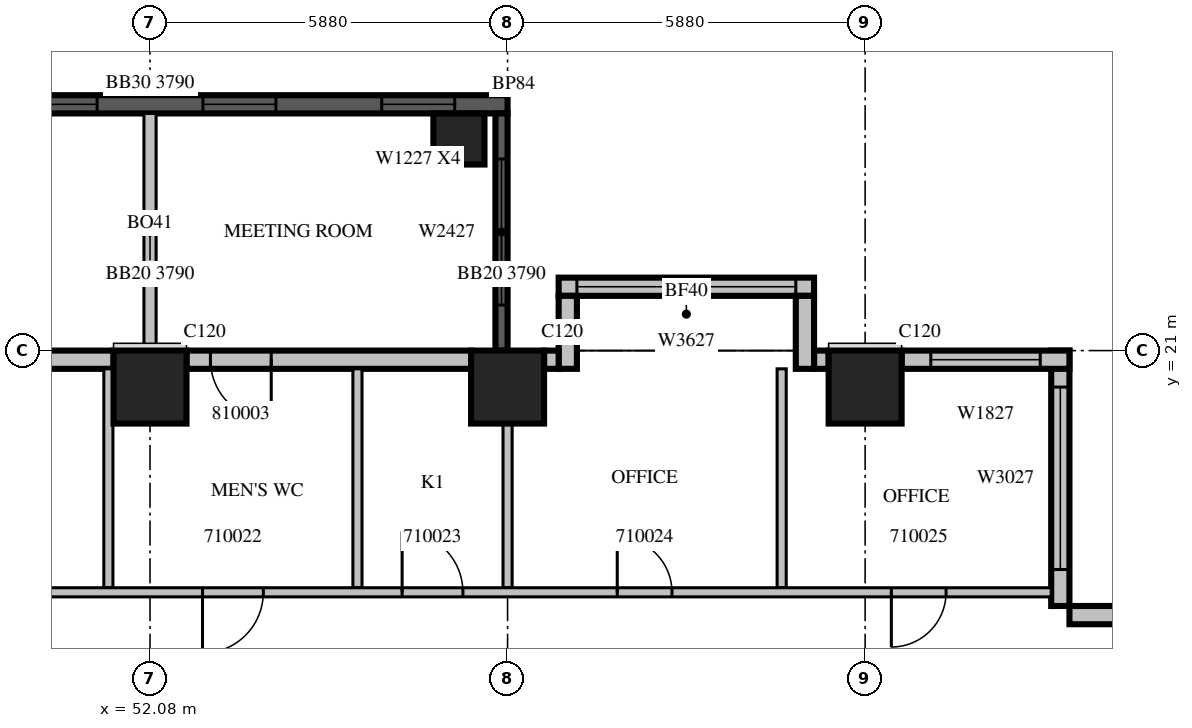
"""IFC4 building model, lengths in metres.
Left out: names, types, materials, properties, quantities, classifications, styles, units other than length and angle.
Written with IfcOpenShell. Run it as: python <this file> out.ifc"""

import sys

from ifc_helpers import new_model, si_unit, direction, frame, frame_2d, origin, origin_2d, place, context, subcontext, project, spatial, rectangle, extrude, source, transform, mapped, element, fill, save


model = new_model("IFC4")
c1 = context("Model", 3, precision=1e-05, world=origin(), true_north=direction((0.0, 1.0)))
c2 = subcontext(c1, "Body", "Model", "MODEL_VIEW")
j1 = project(units=[si_unit("LENGTHUNIT", "METRE"), si_unit("PLANEANGLEUNIT", "RADIAN")], contexts=[c1])
p1 = place(None, origin())
s1 = spatial("IfcSite", under=j1, at=p1, CompositionType="ELEMENT")
p2 = place(p1, origin())
s2 = spatial("IfcBuilding", under=s1, at=p2, CompositionType="ELEMENT")
p3 = place(p2, frame((0.0, 0.0, 53.1)))
s3 = spatial("IfcBuildingStorey", under=s2, at=p3, CompositionType="ELEMENT", Elevation=53.1)
m1 = source(origin(), c2, "Body", "SweptSolid", [
    extrude(rectangle(XDim=1.2, YDim=1.2, at=origin_2d()), origin(), (0.0, 0.0, 1.0), 4.2),
])
for number, where, z_axis, x_axis in (
    (1, (52.08, 20.4, 0.0), (0.0, 0.0, 1.0), (1.0, 0.0, 0.0)),
    (2, (57.96, 20.4, 0.0), (0.0, 0.0, 1.0), (1.0, 0.0, 0.0)),
    (3, (63.84, 20.4, 0.0), (0.0, 0.0, 1.0), (1.0, 0.0, 0.0)),
):
    element("IfcColumn", number, at=place(p3, frame(where, z_axis=z_axis, x_axis=x_axis)), inside=s3, PredefinedType="COLUMN", context=c2, shape_type="MappedRepresentation", body=[
        mapped(m1, transform((0.0, 0.0, 0.0), scale=1.0)),
    ])
m2 = source(origin(), c2, "Body", "SweptSolid", [
    extrude(rectangle(XDim=0.84, YDim=0.84, at=origin_2d()), origin(), (0.0, 0.0, 1.0), 4.2),
])
p4 = place(p3, frame((57.16, 24.48, 0.0), z_axis=(0.0, 0.0, 1.0), x_axis=(1.0, 0.0, 0.0)))
e4 = element("IfcColumn", 4, at=p4, inside=s3, PredefinedType="COLUMN", context=c2, shape_type="MappedRepresentation", body=[
    mapped(m2, transform((0.0, 0.0, 0.0), scale=1.0)),
])
m3 = source(origin(), c2, "Body", "SweptSolid", [
    extrude(rectangle(XDim=11.76, YDim=0.3, at=frame_2d((5.88, 0.0))), origin(), (0.0, 0.0, 1.0), 3.79),
])
p5 = place(p3, frame((57.96, 25.05, 0.0), z_axis=(0.0, 0.0, 1.0), x_axis=(-1.0, 0.0, 0.0)))
e5 = element("IfcWall", 5, at=p5, inside=s3, PredefinedType="SOLIDWALL", context=c2, shape_type="MappedRepresentation", body=[
    mapped(m3, transform((0.0, 0.0, 0.0), scale=1.0)),
])
m4 = source(origin(), c2, "Body", "SweptSolid", [
    extrude(rectangle(XDim=1.2, YDim=2.7, at=frame_2d((0.6, 1.35))), frame((0.0, 0.16, 0.0), z_axis=(0.0, -1.0, 0.0), x_axis=(1.0, 0.0, 0.0)), (0.0, 0.0, 1.0), 0.32),
])
p6 = place(p5, frame((0.87, 0.0, 0.6)))
e6 = element("IfcOpeningElement", 6, at=p6, cuts=e5, PredefinedType="OPENING", context=c2, shape_type="MappedRepresentation", body=[
    mapped(m4, transform((0.0, 0.0, 0.0), scale=1.0)),
])
p7 = place(p5, frame((3.81, 0.0, 0.6)))
e7 = element("IfcOpeningElement", 7, at=p7, cuts=e5, PredefinedType="OPENING", context=c2, shape_type="MappedRepresentation", body=[
    mapped(m4, transform((0.0, 0.0, 0.0), scale=1.0)),
])
p8 = place(p5, frame((6.75, 0.0, 0.6)))
e8 = element("IfcOpeningElement", 8, at=p8, cuts=e5, PredefinedType="OPENING", context=c2, shape_type="MappedRepresentation", body=[
    mapped(m4, transform((0.0, 0.0, 0.0), scale=1.0)),
])
p9 = place(p5, frame((9.69, 0.0, 0.6)))
e9 = element("IfcOpeningElement", 9, at=p9, cuts=e5, PredefinedType="OPENING", context=c2, shape_type="MappedRepresentation", body=[
    mapped(m4, transform((0.0, 0.0, 0.0), scale=1.0)),
])
m5 = source(origin(), c2, "Body", "SweptSolid", [
    extrude(rectangle(XDim=3.9, YDim=0.2, at=frame_2d((1.95, 0.0))), origin(), (0.0, 0.0, 1.0), 3.79),
])
p10 = place(p3, frame((52.08, 21.0, 0.0), z_axis=(0.0, 0.0, 1.0), x_axis=(0.0, 1.0, 0.0)))
e10 = element("IfcWall", 10, at=p10, inside=s3, PredefinedType="SOLIDWALL", context=c2, shape_type="MappedRepresentation", body=[
    mapped(m5, transform((0.0, 0.0, 0.0), scale=1.0)),
])
m6 = source(origin(), c2, "Body", "SweptSolid", [
    extrude(rectangle(XDim=3.9, YDim=0.2, at=frame_2d((1.95, 0.0))), origin(), (0.0, 0.0, 1.0), 3.79),
])
p11 = place(p3, frame((57.86, 21.0, 0.0), z_axis=(0.0, 0.0, 1.0), x_axis=(0.0, 1.0, 0.0)))
e11 = element("IfcWall", 11, at=p11, inside=s3, PredefinedType="SOLIDWALL", context=c2, shape_type="MappedRepresentation", body=[
    mapped(m6, transform((0.0, 0.0, 0.0), scale=1.0)),
])
m7 = source(origin(), c2, "Body", "SweptSolid", [
    extrude(rectangle(XDim=2.4, YDim=2.7, at=frame_2d((1.2, 1.35))), frame((0.0, 0.11, 0.0), z_axis=(0.0, -1.0, 0.0), x_axis=(1.0, 0.0, 0.0)), (0.0, 0.0, 1.0), 0.22),
])
p12 = place(p11, frame((0.75, 0.0, 0.6)))
e12 = element("IfcOpeningElement", 12, at=p12, cuts=e11, PredefinedType="OPENING", context=c2, shape_type="MappedRepresentation", body=[
    mapped(m7, transform((0.0, 0.0, 0.0), scale=1.0)),
])
m8 = source(origin(), c2, "Body", "SweptSolid", [
    extrude(rectangle(XDim=4.2, YDim=0.3, at=frame_2d((2.1, 0.0))), origin(), (0.0, 0.0, 1.0), 3.8),
])
p13 = place(p3, frame((71.4, 16.65, 0.0), z_axis=(0.0, 0.0, 1.0), x_axis=(-1.0, 0.0, 0.0)))
e13 = element("IfcWall", 13, at=p13, inside=s3, PredefinedType="STANDARD", context=c2, shape_type="MappedRepresentation", body=[
    mapped(m8, transform((0.0, 0.0, 0.0), scale=1.0)),
])
p14 = place(p13, frame((0.66, 0.0, 0.6)))
e14 = element("IfcOpeningElement", 14, at=p14, cuts=e13, PredefinedType="OPENING", context=c2, shape_type="MappedRepresentation", body=[
    mapped(m4, transform((0.0, 0.0, 0.0), scale=1.0)),
])
p15 = place(p3, frame((67.05, 16.8, 0.0), z_axis=(0.0, 0.0, 1.0), x_axis=(0.0, 1.0, 0.0)))
e15 = element("IfcWall", 15, at=p15, inside=s3, PredefinedType="STANDARD", context=c2, shape_type="MappedRepresentation", body=[
    mapped(m8, transform((0.0, 0.0, 0.0), scale=1.0)),
])
m9 = source(origin(), c2, "Body", "SweptSolid", [
    extrude(rectangle(XDim=3.0, YDim=2.7, at=frame_2d((1.5, 1.35))), frame((0.0, 0.16, 0.0), z_axis=(0.0, -1.0, 0.0), x_axis=(1.0, 0.0, 0.0)), (0.0, 0.0, 1.0), 0.32),
])
p16 = place(p15, frame((0.6, 0.0, 0.6)))
e16 = element("IfcOpeningElement", 16, at=p16, cuts=e15, PredefinedType="OPENING", context=c2, shape_type="MappedRepresentation", body=[
    mapped(m9, transform((0.0, 0.0, 0.0), scale=1.0)),
])
m10 = source(origin(), c2, "Body", "SweptSolid", [
    extrude(rectangle(XDim=2.76, YDim=0.3, at=frame_2d((1.38, 0.0))), origin(), (0.0, 0.0, 1.0), 3.8),
])
p17 = place(p3, frame((67.2, 20.85, 0.0), z_axis=(0.0, 0.0, 1.0), x_axis=(-1.0, 0.0, 0.0)))
e17 = element("IfcWall", 17, at=p17, inside=s3, PredefinedType="STANDARD", context=c2, shape_type="MappedRepresentation", body=[
    mapped(m10, transform((0.0, 0.0, 0.0), scale=1.0)),
])
m11 = source(origin(), c2, "Body", "SweptSolid", [
    extrude(rectangle(XDim=1.8, YDim=2.7, at=frame_2d((0.9, 1.35))), frame((0.0, 0.16, 0.0), z_axis=(0.0, -1.0, 0.0), x_axis=(1.0, 0.0, 0.0)), (0.0, 0.0, 1.0), 0.32),
])
p18 = place(p17, frame((0.48, 0.0, 0.6)))
e18 = element("IfcOpeningElement", 18, at=p18, cuts=e17, PredefinedType="OPENING", context=c2, shape_type="MappedRepresentation", body=[
    mapped(m11, transform((0.0, 0.0, 0.0), scale=1.0)),
])
m12 = source(origin(), c2, "Body", "SweptSolid", [
    extrude(rectangle(XDim=0.24, YDim=0.3, at=frame_2d((0.12, 0.0))), origin(), (0.0, 0.0, 1.0), 3.8),
])
p19 = place(p3, frame((63.24, 20.85, 0.0), z_axis=(0.0, 0.0, 1.0), x_axis=(-1.0, 0.0, 0.0)))
e19 = element("IfcWall", 19, at=p19, inside=s3, PredefinedType="STANDARD", context=c2, shape_type="MappedRepresentation", body=[
    mapped(m12, transform((0.0, 0.0, 0.0), scale=1.0)),
])
p20 = place(p3, frame((63.0, 22.05, 0.0), z_axis=(0.0, 0.0, 1.0), x_axis=(-1.0, 0.0, 0.0)))
e20 = element("IfcWall", 20, at=p20, inside=s3, PredefinedType="STANDARD", context=c2, shape_type="MappedRepresentation", body=[
    mapped(m8, transform((0.0, 0.0, 0.0), scale=1.0)),
])
m13 = source(origin(), c2, "Body", "SweptSolid", [
    extrude(rectangle(XDim=3.6, YDim=2.7, at=frame_2d((1.8, 1.35))), frame((0.0, 0.16, 0.0), z_axis=(0.0, -1.0, 0.0), x_axis=(1.0, 0.0, 0.0)), (0.0, 0.0, 1.0), 0.32),
])
p21 = place(p20, frame((0.3, 0.0, 0.6)))
e21 = element("IfcOpeningElement", 21, at=p21, cuts=e20, PredefinedType="OPENING", context=c2, shape_type="MappedRepresentation", body=[
    mapped(m13, transform((0.0, 0.0, 0.0), scale=1.0)),
])
m14 = source(origin(), c2, "Body", "SweptSolid", [
    extrude(rectangle(XDim=1.2, YDim=0.3, at=frame_2d((0.6, 0.0))), origin(), (0.0, 0.0, 1.0), 3.8),
])
for number, where, z_axis, x_axis in (
    (22, (62.85, 20.7, 0.0), (0.0, 0.0, 1.0), (0.0, 1.0, 0.0)),
    (23, (58.95, 20.7, 0.0), (0.0, 0.0, 1.0), (0.0, 1.0, 0.0)),
):
    element("IfcWall", number, at=place(p3, frame(where, z_axis=z_axis, x_axis=x_axis)), inside=s3, PredefinedType="STANDARD", context=c2, shape_type="MappedRepresentation", body=[
        mapped(m14, transform((0.0, 0.0, 0.0), scale=1.0)),
    ])
p22 = place(p3, frame((58.8, 20.85, 0.0), z_axis=(0.0, 0.0, 1.0), x_axis=(-1.0, 0.0, 0.0)))
e24 = element("IfcWall", 24, at=p22, inside=s3, PredefinedType="STANDARD", context=c2, shape_type="MappedRepresentation", body=[
    mapped(m12, transform((0.0, 0.0, 0.0), scale=1.0)),
])
m15 = source(origin(), c2, "Body", "SweptSolid", [
    extrude(rectangle(XDim=4.68, YDim=0.3, at=frame_2d((2.34, 0.0))), origin(), (0.0, 0.0, 1.0), 3.8),
])
p23 = place(p3, frame((57.36, 20.85, 0.0), z_axis=(0.0, 0.0, 1.0), x_axis=(-1.0, 0.0, 0.0)))
e25 = element("IfcWall", 25, at=p23, inside=s3, PredefinedType="STANDARD", context=c2, shape_type="MappedRepresentation", body=[
    mapped(m15, transform((0.0, 0.0, 0.0), scale=1.0)),
])
m16 = source(origin(), c2, "Body", "SweptSolid", [
    extrude(rectangle(XDim=1.0, YDim=2.1, at=frame_2d((0.5, 1.05))), frame((0.0, 0.16, 0.0), z_axis=(0.0, -1.0, 0.0), x_axis=(1.0, 0.0, 0.0)), (0.0, 0.0, 1.0), 0.32),
])
p24 = place(p23, frame((3.287, 0.0, 0.0)))
e26 = element("IfcOpeningElement", 26, at=p24, cuts=e25, PredefinedType="OPENING", context=c2, shape_type="MappedRepresentation", body=[
    mapped(m16, transform((0.0, 0.0, 0.0), scale=1.0)),
])
p25 = place(p3, frame((51.48, 20.85, 0.0), z_axis=(0.0, 0.0, 1.0), x_axis=(-1.0, 0.0, 0.0)))
e27 = element("IfcWall", 27, at=p25, inside=s3, PredefinedType="STANDARD", context=c2, shape_type="MappedRepresentation", body=[
    mapped(m15, transform((0.0, 0.0, 0.0), scale=1.0)),
])
p26 = place(p25, frame((1.887, 0.0, 0.0)))
e28 = element("IfcOpeningElement", 28, at=p26, cuts=e27, PredefinedType="OPENING", context=c2, shape_type="MappedRepresentation", body=[
    mapped(m16, transform((0.0, 0.0, 0.0), scale=1.0)),
])
m17 = source(origin(), c2, "Body", "SweptSolid", [
    extrude(rectangle(XDim=3.6, YDim=0.15, at=frame_2d((1.8, 0.0))), origin(), (0.0, 0.0, 1.0), 3.8),
])
for number, where, z_axis, x_axis in (
    (29, (51.395, 20.7, 0.0), (0.0, 0.0, 1.0), (0.0, -1.0, 0.0)),
    (30, (55.491, 20.7, 0.0), (0.0, 0.0, 1.0), (0.0, -1.0, 0.0)),
    (31, (62.468, 20.7, 0.0), (0.0, 0.0, 1.0), (0.0, -1.0, 0.0)),
):
    element("IfcWall", number, at=place(p3, frame(where, z_axis=z_axis, x_axis=x_axis)), inside=s3, PredefinedType="PARTITIONING", context=c2, shape_type="MappedRepresentation", body=[
        mapped(m17, transform((0.0, 0.0, 0.0), scale=1.0)),
    ])
m18 = source(origin(), c2, "Body", "SweptSolid", [
    extrude(rectangle(XDim=2.701, YDim=0.15, at=frame_2d((1.351, 0.0))), origin(), (0.0, 0.0, 1.0), 3.8),
])
p27 = place(p3, frame((57.96, 17.1, 0.0), z_axis=(0.0, 0.0, 1.0), x_axis=(0.0, 1.0, 0.0)))
e32 = element("IfcWall", 32, at=p27, inside=s3, PredefinedType="PARTITIONING", context=c2, shape_type="MappedRepresentation", body=[
    mapped(m18, transform((0.0, 0.0, 0.0), scale=1.0)),
])
m19 = source(origin(), c2, "Body", "SweptSolid", [
    extrude(rectangle(XDim=37.5, YDim=0.15, at=frame_2d((18.75, 0.0))), origin(), (0.0, 0.0, 1.0), 3.8),
])
p28 = place(p3, frame((29.4, 17.025, 0.0), z_axis=(0.0, 0.0, 1.0), x_axis=(1.0, 0.0, 0.0)))
e33 = element("IfcWall", 33, at=p28, inside=s3, PredefinedType="PARTITIONING", context=c2, shape_type="MappedRepresentation", body=[
    mapped(m19, transform((0.0, 0.0, 0.0), scale=1.0)),
])
m20 = source(origin(), c2, "Body", "SweptSolid", [
    extrude(rectangle(XDim=1.0, YDim=2.1, at=frame_2d((0.5, 1.05))), frame((0.0, 0.085, 0.0), z_axis=(0.0, -1.0, 0.0), x_axis=(1.0, 0.0, 0.0)), (0.0, 0.0, 1.0), 0.17),
])
p29 = place(p28, frame((1.357, 0.0, 0.0)))
e34 = element("IfcOpeningElement", 34, at=p29, cuts=e33, PredefinedType="OPENING", context=c2, shape_type="MappedRepresentation", body=[
    mapped(m20, transform((0.0, 0.0, 0.0), scale=1.0)),
])
p30 = place(p28, frame((4.669, 0.0, 0.0)))
e35 = element("IfcOpeningElement", 35, at=p30, cuts=e33, PredefinedType="OPENING", context=c2, shape_type="MappedRepresentation", body=[
    mapped(m20, transform((0.0, 0.0, 0.0), scale=1.0)),
])
p31 = place(p28, frame((7.012, 0.0, 0.0)))
e36 = element("IfcOpeningElement", 36, at=p31, cuts=e33, PredefinedType="OPENING", context=c2, shape_type="MappedRepresentation", body=[
    mapped(m20, transform((0.0, 0.0, 0.0), scale=1.0)),
])
m21 = source(origin(), c2, "Body", "SweptSolid", [
    extrude(rectangle(XDim=0.9, YDim=2.1, at=frame_2d((0.45, 1.05))), frame((0.0, 0.085, 0.0), z_axis=(0.0, -1.0, 0.0), x_axis=(1.0, 0.0, 0.0)), (0.0, 0.0, 1.0), 0.17),
])
p32 = place(p28, frame((10.05, 0.0, 0.0)))
e37 = element("IfcOpeningElement", 37, at=p32, cuts=e33, PredefinedType="OPENING", context=c2, shape_type="MappedRepresentation", body=[
    mapped(m21, transform((0.0, 0.0, 0.0), scale=1.0)),
])
p33 = place(p28, frame((13.401, 0.0, 0.0)))
e38 = element("IfcOpeningElement", 38, at=p33, cuts=e33, PredefinedType="OPENING", context=c2, shape_type="MappedRepresentation", body=[
    mapped(m21, transform((0.0, 0.0, 0.0), scale=1.0)),
])
p34 = place(p28, frame((15.501, 0.0, 0.0)))
e39 = element("IfcOpeningElement", 39, at=p34, cuts=e33, PredefinedType="OPENING", context=c2, shape_type="MappedRepresentation", body=[
    mapped(m21, transform((0.0, 0.0, 0.0), scale=1.0)),
])
p35 = place(p28, frame((18.898, 0.0, 0.0)))
e40 = element("IfcOpeningElement", 40, at=p35, cuts=e33, PredefinedType="OPENING", context=c2, shape_type="MappedRepresentation", body=[
    mapped(m20, transform((0.0, 0.0, 0.0), scale=1.0)),
])
p36 = place(p28, frame((23.543, 0.0, 0.0)))
e41 = element("IfcOpeningElement", 41, at=p36, cuts=e33, PredefinedType="OPENING", context=c2, shape_type="MappedRepresentation", body=[
    mapped(m20, transform((0.0, 0.0, 0.0), scale=1.0)),
])
p37 = place(p28, frame((26.826, 0.0, 0.0)))
e42 = element("IfcOpeningElement", 42, at=p37, cuts=e33, PredefinedType="OPENING", context=c2, shape_type="MappedRepresentation", body=[
    mapped(m20, transform((0.0, 0.0, 0.0), scale=1.0)),
])
p38 = place(p28, frame((30.364, 0.0, 0.0)))
e43 = element("IfcOpeningElement", 43, at=p38, cuts=e33, PredefinedType="OPENING", context=c2, shape_type="MappedRepresentation", body=[
    mapped(m21, transform((0.0, 0.0, 0.0), scale=1.0)),
])
p39 = place(p28, frame((34.871, 0.0, 0.0)))
e44 = element("IfcOpeningElement", 44, at=p39, cuts=e33, PredefinedType="OPENING", context=c2, shape_type="MappedRepresentation", body=[
    mapped(m21, transform((0.0, 0.0, 0.0), scale=1.0)),
])
m22 = source(origin(), c2, "Body", "SweptSolid", [
    extrude(rectangle(XDim=1.2, YDim=2.7, at=frame_2d((0.6, 1.35))), frame((0.0, 0.03, 0.0), z_axis=(0.0, -1.0, 0.0), x_axis=(1.0, 0.0, 0.0)), (0.0, 0.0, 1.0), 0.06),
])
p40 = place(p6, origin())
e45 = element("IfcWindow", 45, at=p40, inside=s3, PartitioningType="SINGLE_PANEL", PredefinedType="WINDOW", context=c2, shape_type="MappedRepresentation", body=[
    mapped(m22, transform((0.0, 0.0, 0.0), scale=1.0)),
])
fill(e6, e45)
p41 = place(p7, origin())
e46 = element("IfcWindow", 46, at=p41, inside=s3, PartitioningType="SINGLE_PANEL", PredefinedType="WINDOW", context=c2, shape_type="MappedRepresentation", body=[
    mapped(m22, transform((0.0, 0.0, 0.0), scale=1.0)),
])
fill(e7, e46)
p42 = place(p8, origin())
e47 = element("IfcWindow", 47, at=p42, inside=s3, PartitioningType="SINGLE_PANEL", PredefinedType="WINDOW", context=c2, shape_type="MappedRepresentation", body=[
    mapped(m22, transform((0.0, 0.0, 0.0), scale=1.0)),
])
fill(e8, e47)
m23 = source(origin(), c2, "Body", "SweptSolid", [
    extrude(rectangle(XDim=2.4, YDim=2.7, at=frame_2d((1.2, 1.35))), frame((0.0, 0.03, 0.0), z_axis=(0.0, -1.0, 0.0), x_axis=(1.0, 0.0, 0.0)), (0.0, 0.0, 1.0), 0.06),
])
p43 = place(p12, origin())
e48 = element("IfcWindow", 48, at=p43, inside=s3, PartitioningType="SINGLE_PANEL", PredefinedType="WINDOW", context=c2, shape_type="MappedRepresentation", body=[
    mapped(m23, transform((0.0, 0.0, 0.0), scale=1.0)),
])
fill(e12, e48)
m24 = source(origin(), c2, "Body", "SweptSolid", [
    extrude(rectangle(XDim=3.0, YDim=2.7, at=frame_2d((1.5, 1.35))), frame((0.0, 0.03, 0.0), z_axis=(0.0, -1.0, 0.0), x_axis=(1.0, 0.0, 0.0)), (0.0, 0.0, 1.0), 0.06),
])
p44 = place(p16, origin())
e49 = element("IfcWindow", 49, at=p44, inside=s3, PartitioningType="SINGLE_PANEL", PredefinedType="WINDOW", context=c2, shape_type="MappedRepresentation", body=[
    mapped(m24, transform((0.0, 0.0, 0.0), scale=1.0)),
])
fill(e16, e49)
m25 = source(origin(), c2, "Body", "SweptSolid", [
    extrude(rectangle(XDim=1.8, YDim=2.7, at=frame_2d((0.9, 1.35))), frame((0.0, 0.03, 0.0), z_axis=(0.0, -1.0, 0.0), x_axis=(1.0, 0.0, 0.0)), (0.0, 0.0, 1.0), 0.06),
])
p45 = place(p18, origin())
e50 = element("IfcWindow", 50, at=p45, inside=s3, PartitioningType="SINGLE_PANEL", PredefinedType="WINDOW", context=c2, shape_type="MappedRepresentation", body=[
    mapped(m25, transform((0.0, 0.0, 0.0), scale=1.0)),
])
fill(e18, e50)
m26 = source(origin(), c2, "Body", "SweptSolid", [
    extrude(rectangle(XDim=3.6, YDim=2.7, at=frame_2d((1.8, 1.35))), frame((0.0, 0.03, 0.0), z_axis=(0.0, -1.0, 0.0), x_axis=(1.0, 0.0, 0.0)), (0.0, 0.0, 1.0), 0.06),
])
p46 = place(p21, origin())
e51 = element("IfcWindow", 51, at=p46, inside=s3, PartitioningType="SINGLE_PANEL", PredefinedType="WINDOW", context=c2, shape_type="MappedRepresentation", body=[
    mapped(m26, transform((0.0, 0.0, 0.0), scale=1.0)),
])
fill(e21, e51)
m27 = source(origin(), c2, "Body", "SweptSolid", [
    extrude(rectangle(XDim=1.0, YDim=2.1, at=frame_2d((0.5, 1.05))), frame((0.0, 0.025, 0.0), z_axis=(0.0, -1.0, 0.0), x_axis=(1.0, 0.0, 0.0)), (0.0, 0.0, 1.0), 0.05),
])
p47 = place(p36, origin())
e52 = element("IfcDoor", 52, at=p47, inside=s3, OperationType="SINGLE_SWING_RIGHT", PredefinedType="DOOR", context=c2, shape_type="MappedRepresentation", body=[
    mapped(m27, transform((0.0, 0.0, 0.0), scale=1.0)),
])
fill(e41, e52)
p48 = place(p37, origin())
e53 = element("IfcDoor", 53, at=p48, inside=s3, OperationType="SINGLE_SWING_LEFT", PredefinedType="DOOR", context=c2, shape_type="MappedRepresentation", body=[
    mapped(m27, transform((0.0, 0.0, 0.0), scale=1.0)),
])
fill(e42, e53)
m28 = source(origin(), c2, "Body", "SweptSolid", [
    extrude(rectangle(XDim=0.9, YDim=2.1, at=frame_2d((0.45, 1.05))), frame((0.0, 0.025, 0.0), z_axis=(0.0, -1.0, 0.0), x_axis=(1.0, 0.0, 0.0)), (0.0, 0.0, 1.0), 0.05),
])
p49 = place(p38, origin())
e54 = element("IfcDoor", 54, at=p49, inside=s3, OperationType="SINGLE_SWING_LEFT", PredefinedType="DOOR", context=c2, shape_type="MappedRepresentation", body=[
    mapped(m28, transform((0.0, 0.0, 0.0), scale=1.0)),
])
fill(e43, e54)
p50 = place(p39, origin())
e55 = element("IfcDoor", 55, at=p50, inside=s3, OperationType="SINGLE_SWING_RIGHT", PredefinedType="DOOR", context=c2, shape_type="MappedRepresentation", body=[
    mapped(m28, transform((0.0, 0.0, 0.0), scale=1.0)),
])
fill(e44, e55)
p51 = place(p24, origin())
e56 = element("IfcDoor", 56, at=p51, inside=s3, OperationType="SINGLE_SWING_LEFT", PredefinedType="DOOR", context=c2, shape_type="MappedRepresentation", body=[
    mapped(m27, transform((0.0, 0.0, 0.0), scale=1.0)),
])
fill(e26, e56)
save(model, sys.argv[1])
